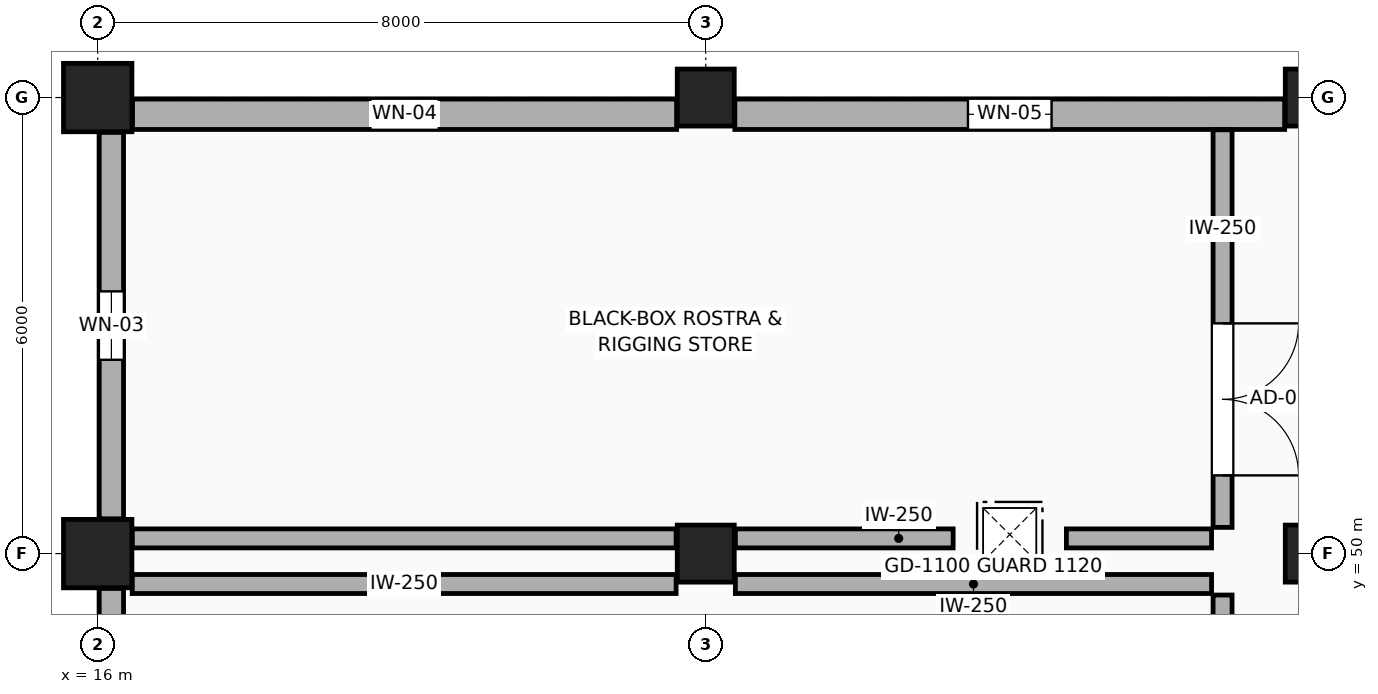
"""IFC4 building model, lengths in metres.
Left out: names, types, materials, properties, quantities, classifications, styles, units other than length and angle.
Written with IfcOpenShell. Run it as: python <this file> out.ifc"""

import sys

from ifc_helpers import new_model, si_unit, direction, frame, frame_2d, origin, origin_2d, place, context, subcontext, project, spatial, rectangle, extrude, element, fill, save


model = new_model("IFC4")
c1 = context("Model", 3, precision=1e-05, world=origin(), true_north=direction((0.0, 1.0)))
c2 = subcontext(c1, "Body", "Model", "MODEL_VIEW")
j1 = project(units=[si_unit("LENGTHUNIT", "METRE"), si_unit("PLANEANGLEUNIT", "RADIAN")], contexts=[c1])
p1 = place(None, origin())
s1 = spatial("IfcSite", under=j1, at=p1, CompositionType="ELEMENT")
p2 = place(p1, origin())
s2 = spatial("IfcBuilding", under=s1, at=p2, CompositionType="ELEMENT")
p3 = place(p2, frame((0.0, 0.0, 10.2)))
s3 = spatial("IfcBuildingStorey", under=s2, at=p3, CompositionType="ELEMENT", Elevation=10.2)
for number, where, z_axis, x_axis in (
    (1, (16.0, 50.0, 0.0), (0.0, 0.0, 1.0), (1.0, 0.0, 0.0)),
    (2, (16.0, 56.0, 0.0), (0.0, 0.0, 1.0), (1.0, 0.0, 0.0)),
):
    element("IfcColumn", number, at=place(p3, frame(where, z_axis=z_axis, x_axis=x_axis)), inside=s3, PredefinedType="COLUMN", context=c2, shape_type="SweptSolid", body=[
        extrude(rectangle(XDim=0.9, YDim=0.9, at=origin_2d()), origin(), (0.0, 0.0, 1.0), 4.8),
    ])
for number, where, z_axis, x_axis in (
    (3, (24.0, 50.0, 0.0), (0.0, 0.0, 1.0), (1.0, 0.0, 0.0)),
    (4, (24.0, 56.0, 0.0), (0.0, 0.0, 1.0), (1.0, 0.0, 0.0)),
    (5, (32.0, 50.0, 0.0), (0.0, 0.0, 1.0), (1.0, 0.0, 0.0)),
    (6, (32.0, 56.0, 0.0), (0.0, 0.0, 1.0), (1.0, 0.0, 0.0)),
):
    element("IfcColumn", number, at=place(p3, frame(where, z_axis=z_axis, x_axis=x_axis)), inside=s3, PredefinedType="COLUMN", context=c2, shape_type="SweptSolid", body=[
        extrude(rectangle(XDim=0.75, YDim=0.75, at=origin_2d()), origin(), (0.0, 0.0, 1.0), 4.8),
    ])
p4 = place(p3, frame((16.18, 41.458, 0.0), z_axis=(0.0, 0.0, 1.0), x_axis=(0.0, 1.0, 0.0)))
e7 = element("IfcWall", 7, at=p4, inside=s3, PredefinedType="STANDARD", context=c2, shape_type="SweptSolid", body=[
    extrude(rectangle(XDim=8.084, YDim=0.32, at=frame_2d((4.042, 0.0))), origin(), (0.0, 0.0, 1.0), 4.025),
])
p5 = place(p4, frame((3.592, 0.0, 0.95)))
e8 = element("IfcOpeningElement", 8, at=p5, cuts=e7, PredefinedType="OPENING", context=c2, shape_type="SweptSolid", body=[
    extrude(rectangle(XDim=0.9, YDim=1.5, at=frame_2d((0.45, 0.75))), frame((0.0, 0.17, 0.0), z_axis=(0.0, -1.0, 0.0), x_axis=(1.0, 0.0, 0.0)), (0.0, 0.0, 1.0), 0.34),
])
p6 = place(p3, frame((16.18, 50.458, 0.0), z_axis=(0.0, 0.0, 1.0), x_axis=(0.0, 1.0, 0.0)))
e9 = element("IfcWall", 9, at=p6, inside=s3, PredefinedType="STANDARD", context=c2, shape_type="SweptSolid", body=[
    extrude(rectangle(XDim=5.084, YDim=0.32, at=frame_2d((2.542, 0.0))), origin(), (0.0, 0.0, 1.0), 4.075),
])
p7 = place(p6, frame((2.092, 0.0, 0.95)))
e10 = element("IfcOpeningElement", 10, at=p7, cuts=e9, PredefinedType="OPENING", context=c2, shape_type="SweptSolid", body=[
    extrude(rectangle(XDim=0.9, YDim=1.8, at=frame_2d((0.45, 0.9))), frame((0.0, 0.17, 0.0), z_axis=(0.0, -1.0, 0.0), x_axis=(1.0, 0.0, 0.0)), (0.0, 0.0, 1.0), 0.34),
])
p8 = place(p3, frame((16.458, 55.78, 0.0), z_axis=(0.0, 0.0, 1.0), x_axis=(1.0, 0.0, 0.0)))
e11 = element("IfcWall", 11, at=p8, inside=s3, PredefinedType="STANDARD", context=c2, shape_type="SweptSolid", body=[
    extrude(rectangle(XDim=7.159, YDim=0.4, at=frame_2d((3.58, 0.0))), origin(), (0.0, 0.0, 1.0), 4.075),
])
p9 = place(p8, frame((3.13, 0.0, 0.95)))
e12 = element("IfcOpeningElement", 12, at=p9, cuts=e11, PredefinedType="OPENING", context=c2, shape_type="SweptSolid", body=[
    extrude(rectangle(XDim=0.9, YDim=2.1, at=frame_2d((0.45, 1.05))), frame((0.0, 0.21, 0.0), z_axis=(0.0, -1.0, 0.0), x_axis=(1.0, 0.0, 0.0)), (0.0, 0.0, 1.0), 0.42),
])
p10 = place(p3, frame((24.383, 55.78, 0.0), z_axis=(0.0, 0.0, 1.0), x_axis=(1.0, 0.0, 0.0)))
e13 = element("IfcWall", 13, at=p10, inside=s3, PredefinedType="STANDARD", context=c2, shape_type="SweptSolid", body=[
    extrude(rectangle(XDim=7.234, YDim=0.4, at=frame_2d((3.617, 0.0))), origin(), (0.0, 0.0, 1.0), 3.925),
])
p11 = place(p10, frame((3.067, 0.0, 0.95)))
e14 = element("IfcOpeningElement", 14, at=p11, cuts=e13, PredefinedType="OPENING", context=c2, shape_type="SweptSolid", body=[
    extrude(rectangle(XDim=1.1, YDim=1.2, at=frame_2d((0.55, 0.6))), frame((0.0, 0.21, 0.0), z_axis=(0.0, -1.0, 0.0), x_axis=(1.0, 0.0, 0.0)), (0.0, 0.0, 1.0), 0.42),
])
p12 = place(p3, frame((16.454, 49.6, 0.0), z_axis=(0.0, 0.0, 1.0), x_axis=(1.0, 0.0, 0.0)))
e15 = element("IfcWall", 15, at=p12, inside=s3, PredefinedType="PARTITIONING", context=c2, shape_type="SweptSolid", body=[
    extrude(rectangle(XDim=7.156, YDim=0.25, at=frame_2d((3.578, 0.0))), origin(), (0.0, 0.0, 1.0), 4.53),
])
p13 = place(p3, frame((24.39, 49.6, 0.0), z_axis=(0.0, 0.0, 1.0), x_axis=(1.0, 0.0, 0.0)))
e16 = element("IfcWall", 16, at=p13, inside=s3, PredefinedType="PARTITIONING", context=c2, shape_type="SweptSolid", body=[
    extrude(rectangle(XDim=6.265, YDim=0.25, at=frame_2d((3.133, 0.0))), origin(), (0.0, 0.0, 1.0), 4.53),
])
p14 = place(p3, frame((30.8, 49.455, 0.0), z_axis=(0.0, 0.0, 1.0), x_axis=(0.0, -1.0, 0.0)))
e17 = element("IfcWall", 17, at=p14, inside=s3, PredefinedType="PARTITIONING", context=c2, shape_type="SweptSolid", body=[
    extrude(rectangle(XDim=24.91, YDim=0.25, at=frame_2d((12.455, 0.0))), origin(), (0.0, 0.0, 1.0), 4.53),
])
p15 = place(p3, frame((30.8, 55.576, 0.0), z_axis=(0.0, 0.0, 1.0), x_axis=(0.0, -1.0, 0.0)))
e18 = element("IfcWall", 18, at=p15, inside=s3, PredefinedType="PARTITIONING", context=c2, shape_type="SweptSolid", body=[
    extrude(rectangle(XDim=5.231, YDim=0.25, at=frame_2d((2.615, 0.0))), origin(), (0.0, 0.0, 1.0), 4.53),
])
p16 = place(p15, frame((2.547, 0.0, 0.0)))
e19 = element("IfcOpeningElement", 19, at=p16, cuts=e18, PredefinedType="OPENING", context=c2, shape_type="SweptSolid", body=[
    extrude(rectangle(XDim=2.0, YDim=2.35, at=frame_2d((1.0, 1.175))), frame((0.0, 0.135, 0.0), z_axis=(0.0, -1.0, 0.0), x_axis=(1.0, 0.0, 0.0)), (0.0, 0.0, 1.0), 0.27),
])
p17 = place(p3, frame((30.655, 50.2, 0.0), z_axis=(0.0, 0.0, 1.0), x_axis=(-1.0, 0.0, 0.0)))
e20 = element("IfcWall", 20, at=p17, inside=s3, PredefinedType="PARTITIONING", context=c2, shape_type="SweptSolid", body=[
    extrude(rectangle(XDim=1.91, YDim=0.25, at=frame_2d((0.955, 0.0))), origin(), (0.0, 0.0, 1.0), 4.07),
])
p18 = place(p3, frame((27.255, 50.2, 0.0), z_axis=(0.0, 0.0, 1.0), x_axis=(-1.0, 0.0, 0.0)))
e21 = element("IfcWall", 21, at=p18, inside=s3, PredefinedType="PARTITIONING", context=c2, shape_type="SweptSolid", body=[
    extrude(rectangle(XDim=2.865, YDim=0.25, at=frame_2d((1.433, 0.0))), origin(), (0.0, 0.0, 1.0), 4.07),
])
p19 = place(p3, frame((23.61, 50.2, 0.0), z_axis=(0.0, 0.0, 1.0), x_axis=(-1.0, 0.0, 0.0)))
e22 = element("IfcWall", 22, at=p19, inside=s3, PredefinedType="PARTITIONING", context=c2, shape_type="SweptSolid", body=[
    extrude(rectangle(XDim=7.156, YDim=0.25, at=frame_2d((3.578, 0.0))), origin(), (0.0, 0.0, 1.0), 4.02),
])
p20 = place(p7, origin())
e23 = element("IfcWindow", 23, at=p20, inside=s3, PartitioningType="SINGLE_PANEL", PredefinedType="WINDOW", context=c2, shape_type="SweptSolid", body=[
    extrude(rectangle(XDim=0.9, YDim=1.8, at=frame_2d((0.45, 0.9))), frame((0.0, 0.03, 0.0), z_axis=(0.0, -1.0, 0.0), x_axis=(1.0, 0.0, 0.0)), (0.0, 0.0, 1.0), 0.06),
])
fill(e10, e23)
p21 = place(p9, origin())
e24 = element("IfcWindow", 24, at=p21, inside=s3, PartitioningType="SINGLE_PANEL", PredefinedType="WINDOW", context=c2, shape_type="SweptSolid", body=[
    extrude(rectangle(XDim=0.9, YDim=2.1, at=frame_2d((0.45, 1.05))), frame((0.0, 0.03, 0.0), z_axis=(0.0, -1.0, 0.0), x_axis=(1.0, 0.0, 0.0)), (0.0, 0.0, 1.0), 0.06),
])
fill(e12, e24)
p22 = place(p11, origin())
e25 = element("IfcWindow", 25, at=p22, inside=s3, PartitioningType="SINGLE_PANEL", PredefinedType="WINDOW", context=c2, shape_type="SweptSolid", body=[
    extrude(rectangle(XDim=1.1, YDim=1.2, at=frame_2d((0.55, 0.6))), frame((0.0, 0.03, 0.0), z_axis=(0.0, -1.0, 0.0), x_axis=(1.0, 0.0, 0.0)), (0.0, 0.0, 1.0), 0.06),
])
fill(e14, e25)
p23 = place(p16, origin())
e26 = element("IfcDoor", 26, at=p23, inside=s3, OperationType="DOUBLE_SWING_LEFT", PredefinedType="DOOR", context=c2, shape_type="SweptSolid", body=[
    extrude(rectangle(XDim=2.0, YDim=2.35, at=frame_2d((1.0, 1.175))), frame((0.0, 0.025, 0.0), z_axis=(0.0, -1.0, 0.0), x_axis=(1.0, 0.0, 0.0)), (0.0, 0.0, 1.0), 0.05),
])
fill(e19, e26)
save(model, sys.argv[1])
